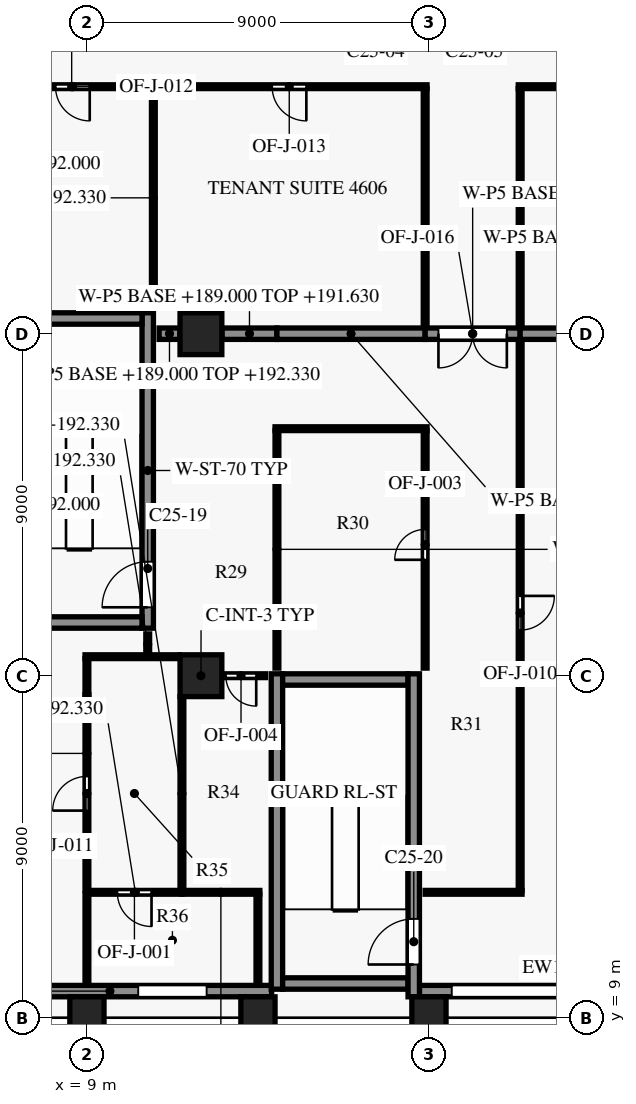
"""IFC4 building model, lengths in metres.
Left out: names, types, materials, properties, quantities, classifications, styles, units other than length and angle.
Written with IfcOpenShell. Run it as: python <this file> out.ifc"""

import sys

from ifc_helpers import new_model, si_unit, direction, frame, frame_2d, origin, origin_2d, place, context, subcontext, project, spatial, rectangle, extrude, element, fill, save


model = new_model("IFC4")
c1 = context("Model", 3, precision=1e-05, world=origin(), true_north=direction((0.0, 1.0)))
c2 = subcontext(c1, "Body", "Model", "MODEL_VIEW")
j1 = project(units=[si_unit("LENGTHUNIT", "METRE"), si_unit("PLANEANGLEUNIT", "RADIAN")], contexts=[c1])
p1 = place(None, origin())
s1 = spatial("IfcSite", under=j1, at=p1, CompositionType="ELEMENT")
p2 = place(p1, origin())
s2 = spatial("IfcBuilding", under=s1, at=p2, CompositionType="ELEMENT")
p3 = place(p2, frame((0.0, 0.0, 189.0)))
s3 = spatial("IfcBuildingStorey", under=s2, at=p3, CompositionType="ELEMENT", Elevation=189.0)
for number, where, z_axis, x_axis in (
    (1, (9.0, 9.0, 0.0), (0.0, 0.0, 1.0), (1.0, 0.0, 0.0)),
    (2, (13.5, 9.0, 0.0), (0.0, 0.0, 1.0), (1.0, 0.0, 0.0)),
    (3, (18.0, 9.0, 0.0), (0.0, 0.0, 1.0), (1.0, 0.0, 0.0)),
):
    element("IfcColumn", number, at=place(p3, frame(where, z_axis=z_axis, x_axis=x_axis)), inside=s3, PredefinedType="COLUMN", context=c2, shape_type="SweptSolid", body=[
        extrude(rectangle(XDim=0.9, YDim=1.1, at=origin_2d()), origin(), (0.0, 0.0, 1.0), 3.8),
    ])
for number, where, z_axis, x_axis in (
    (4, (12.0, 18.0, 0.0), (0.0, 0.0, 1.0), (1.0, 0.0, 0.0)),
    (5, (12.0, 27.0, 0.0), (0.0, 0.0, 1.0), (1.0, 0.0, 0.0)),
):
    element("IfcColumn", number, at=place(p3, frame(where, z_axis=z_axis, x_axis=x_axis)), inside=s3, PredefinedType="COLUMN", context=c2, shape_type="SweptSolid", body=[
        extrude(rectangle(XDim=1.1, YDim=1.1, at=origin_2d()), origin(), (0.0, 0.0, 1.0), 3.8),
    ])
p4 = place(p3, frame((13.86, 9.7, 0.0), z_axis=(0.0, 0.0, 1.0), x_axis=(-1.0, 0.0, 0.0)))
e6 = element("IfcWall", 6, at=p4, inside=s3, PredefinedType="SOLIDWALL", context=c2, shape_type="SweptSolid", body=[
    extrude(rectangle(XDim=8.51, YDim=0.3, at=frame_2d((4.255, 0.0))), origin(), (0.0, 0.0, 1.0), 3.0),
])
p5 = place(p4, frame((1.71, 0.0, 0.75)))
e7 = element("IfcOpeningElement", 7, at=p5, cuts=e6, PredefinedType="OPENING", context=c2, shape_type="SweptSolid", body=[
    extrude(rectangle(XDim=1.8, YDim=1.8, at=frame_2d((0.9, 0.9))), frame((0.0, 0.16, 0.0), z_axis=(0.0, -1.0, 0.0), x_axis=(1.0, 0.0, 0.0)), (0.0, 0.0, 1.0), 0.32),
])
p6 = place(p4, frame((6.21, 0.0, 0.75)))
e8 = element("IfcOpeningElement", 8, at=p6, cuts=e6, PredefinedType="OPENING", context=c2, shape_type="SweptSolid", body=[
    extrude(rectangle(XDim=1.8, YDim=1.8, at=frame_2d((0.9, 0.9))), frame((0.0, 0.16, 0.0), z_axis=(0.0, -1.0, 0.0), x_axis=(1.0, 0.0, 0.0)), (0.0, 0.0, 1.0), 0.32),
])
p7 = place(p3, frame((30.95, 9.7, 0.0), z_axis=(0.0, 0.0, 1.0), x_axis=(-1.0, 0.0, 0.0)))
e9 = element("IfcWall", 9, at=p7, inside=s3, PredefinedType="SOLIDWALL", context=c2, shape_type="SweptSolid", body=[
    extrude(rectangle(XDim=13.2, YDim=0.3, at=frame_2d((6.6, 0.0))), origin(), (0.0, 0.0, 1.0), 3.0),
])
p8 = place(p7, frame((0.8, 0.0, 0.75)))
e10 = element("IfcOpeningElement", 10, at=p8, cuts=e9, PredefinedType="OPENING", context=c2, shape_type="SweptSolid", body=[
    extrude(rectangle(XDim=1.8, YDim=1.8, at=frame_2d((0.9, 0.9))), frame((0.0, 0.16, 0.0), z_axis=(0.0, -1.0, 0.0), x_axis=(1.0, 0.0, 0.0)), (0.0, 0.0, 1.0), 0.32),
])
p9 = place(p7, frame((5.3, 0.0, 0.75)))
e11 = element("IfcOpeningElement", 11, at=p9, cuts=e9, PredefinedType="OPENING", context=c2, shape_type="SweptSolid", body=[
    extrude(rectangle(XDim=1.8, YDim=1.8, at=frame_2d((0.9, 0.9))), frame((0.0, 0.16, 0.0), z_axis=(0.0, -1.0, 0.0), x_axis=(1.0, 0.0, 0.0)), (0.0, 0.0, 1.0), 0.32),
])
p10 = place(p7, frame((9.05, 0.0, 0.15)))
e12 = element("IfcOpeningElement", 12, at=p10, cuts=e9, PredefinedType="OPENING", context=c2, shape_type="SweptSolid", body=[
    extrude(rectangle(XDim=3.3, YDim=2.4, at=frame_2d((1.65, 1.2))), frame((0.0, 0.16, 0.0), z_axis=(0.0, -1.0, 0.0), x_axis=(1.0, 0.0, 0.0)), (0.0, 0.0, 1.0), 0.32),
])
for number, where, z_axis, x_axis in (
    (13, (14.15, 9.9, 0.0), (0.0, 0.0, 1.0), (1.0, 0.0, 0.0)),
    (14, (14.15, 17.9, 0.0), (0.0, 0.0, 1.0), (1.0, 0.0, 0.0)),
    (15, (7.15, 19.4, 0.0), (0.0, 0.0, 1.0), (1.0, 0.0, 0.0)),
    (16, (7.15, 27.4, 0.0), (0.0, 0.0, 1.0), (1.0, 0.0, 0.0)),
):
    element("IfcWall", number, at=place(p3, frame(where, z_axis=z_axis, x_axis=x_axis)), inside=s3, PredefinedType="SHEAR", context=c2, shape_type="SweptSolid", body=[
        extrude(rectangle(XDim=3.3, YDim=0.3, at=frame_2d((1.65, 0.0))), origin(), (0.0, 0.0, 1.0), 3.5),
    ])
p11 = place(p3, frame((10.6, 19.25, 0.0), z_axis=(0.0, 0.0, 1.0), x_axis=(0.0, 1.0, 0.0)))
e17 = element("IfcWall", 17, at=p11, inside=s3, PredefinedType="SHEAR", context=c2, shape_type="SweptSolid", body=[
    extrude(rectangle(XDim=8.3, YDim=0.3, at=frame_2d((4.15, 0.0))), origin(), (0.0, 0.0, 1.0), 3.5),
])
p12 = place(p11, frame((0.55, 0.0, 0.0)))
e18 = element("IfcOpeningElement", 18, at=p12, cuts=e17, PredefinedType="OPENING", context=c2, shape_type="SweptSolid", body=[
    extrude(rectangle(XDim=1.2, YDim=2.2, at=frame_2d((0.6, 1.1))), frame((0.0, 0.16, 0.0), z_axis=(0.0, -1.0, 0.0), x_axis=(1.0, 0.0, 0.0)), (0.0, 0.0, 1.0), 0.32),
])
p13 = place(p3, frame((14.0, 9.75, 0.0), z_axis=(0.0, 0.0, 1.0), x_axis=(0.0, 1.0, 0.0)))
e19 = element("IfcWall", 19, at=p13, inside=s3, PredefinedType="SHEAR", context=c2, shape_type="SweptSolid", body=[
    extrude(rectangle(XDim=8.3, YDim=0.3, at=frame_2d((4.15, 0.0))), origin(), (0.0, 0.0, 1.0), 3.5),
])
p14 = place(p3, frame((17.6, 9.55, 0.0), z_axis=(0.0, 0.0, 1.0), x_axis=(0.0, 1.0, 0.0)))
e20 = element("IfcWall", 20, at=p14, inside=s3, PredefinedType="SHEAR", context=c2, shape_type="SweptSolid", body=[
    extrude(rectangle(XDim=8.5, YDim=0.3, at=frame_2d((4.25, 0.0))), origin(), (0.0, 0.0, 1.0), 3.5),
])
p15 = place(p14, frame((0.85, 0.0, 0.0)))
e21 = element("IfcOpeningElement", 21, at=p15, cuts=e20, PredefinedType="OPENING", context=c2, shape_type="SweptSolid", body=[
    extrude(rectangle(XDim=1.2, YDim=2.2, at=frame_2d((0.6, 1.1))), frame((0.0, 0.16, 0.0), z_axis=(0.0, -1.0, 0.0), x_axis=(1.0, 0.0, 0.0)), (0.0, 0.0, 1.0), 0.32),
])
p16 = place(p3, frame((9.0, 9.87, 0.0), z_axis=(0.0, 0.0, 1.0), x_axis=(0.0, 1.0, 0.0)))
e22 = element("IfcWall", 22, at=p16, inside=s3, PredefinedType="PARTITIONING", context=c2, shape_type="SweptSolid", body=[
    extrude(rectangle(XDim=2.38, YDim=0.1, at=frame_2d((1.19, 0.0))), origin(), (0.0, 0.0, 1.0), 3.33),
])
p17 = place(p3, frame((13.5, 12.25, 0.0), z_axis=(0.0, 0.0, 1.0), x_axis=(0.0, -1.0, 0.0)))
e23 = element("IfcWall", 23, at=p17, inside=s3, PredefinedType="PARTITIONING", context=c2, shape_type="SweptSolid", body=[
    extrude(rectangle(XDim=2.38, YDim=0.1, at=frame_2d((1.19, 0.0))), origin(), (0.0, 0.0, 1.0), 2.63),
])
p18 = place(p3, frame((11.5, 12.3, 0.0), z_axis=(0.0, 0.0, 1.0), x_axis=(-1.0, 0.0, 0.0)))
e24 = element("IfcWall", 24, at=p18, inside=s3, PredefinedType="PARTITIONING", context=c2, shape_type="SweptSolid", body=[
    extrude(rectangle(XDim=2.45, YDim=0.1, at=frame_2d((1.225, 0.0))), origin(), (0.0, 0.0, 1.0), 3.33),
])
p19 = place(p18, frame((0.8, 0.0, 0.0)))
e25 = element("IfcOpeningElement", 25, at=p19, cuts=e24, PredefinedType="OPENING", context=c2, shape_type="SweptSolid", body=[
    extrude(rectangle(XDim=0.9, YDim=2.1, at=frame_2d((0.45, 1.05))), frame((0.0, 0.06, 0.0), z_axis=(0.0, -1.0, 0.0), x_axis=(1.0, 0.0, 0.0)), (0.0, 0.0, 1.0), 0.12),
])
p20 = place(p3, frame((11.5, 12.3, 0.0), z_axis=(0.0, 0.0, 1.0), x_axis=(1.0, 0.0, 0.0)))
e26 = element("IfcWall", 26, at=p20, inside=s3, PredefinedType="PARTITIONING", context=c2, shape_type="SweptSolid", body=[
    extrude(rectangle(XDim=2.05, YDim=0.1, at=frame_2d((1.025, 0.0))), origin(), (0.0, 0.0, 1.0), 2.63),
])
p21 = place(p3, frame((20.45, 12.3, 0.0), z_axis=(0.0, 0.0, 1.0), x_axis=(-1.0, 0.0, 0.0)))
e27 = element("IfcWall", 27, at=p21, inside=s3, PredefinedType="PARTITIONING", context=c2, shape_type="SweptSolid", body=[
    extrude(rectangle(XDim=2.55, YDim=0.1, at=frame_2d((1.275, 0.0))), origin(), (0.0, 0.0, 1.0), 2.63),
])
p22 = place(p3, frame((9.0, 12.35, 0.0), z_axis=(0.0, 0.0, 1.0), x_axis=(0.0, 1.0, 0.0)))
e28 = element("IfcWall", 28, at=p22, inside=s3, PredefinedType="PARTITIONING", context=c2, shape_type="SweptSolid", body=[
    extrude(rectangle(XDim=5.15, YDim=0.1, at=frame_2d((2.575, 0.0))), origin(), (0.0, 0.0, 1.0), 3.33),
])
p23 = place(p22, frame((2.1, 0.0, 0.0)))
e29 = element("IfcOpeningElement", 29, at=p23, cuts=e28, PredefinedType="OPENING", context=c2, shape_type="SweptSolid", body=[
    extrude(rectangle(XDim=0.9, YDim=2.1, at=frame_2d((0.45, 1.05))), frame((0.0, 0.06, 0.0), z_axis=(0.0, -1.0, 0.0), x_axis=(1.0, 0.0, 0.0)), (0.0, 0.0, 1.0), 0.12),
])
p24 = place(p3, frame((11.5, 17.445, 0.0), z_axis=(0.0, 0.0, 1.0), x_axis=(0.0, -1.0, 0.0)))
e30 = element("IfcWall", 30, at=p24, inside=s3, PredefinedType="PARTITIONING", context=c2, shape_type="SweptSolid", body=[
    extrude(rectangle(XDim=5.095, YDim=0.1, at=frame_2d((2.547, 0.0))), origin(), (0.0, 0.0, 1.0), 3.33),
])
p25 = place(p3, frame((9.0, 17.5, 0.0), z_axis=(0.0, 0.0, 1.0), x_axis=(0.0, 1.0, 0.0)))
e31 = element("IfcWall", 31, at=p25, inside=s3, PredefinedType="PARTITIONING", context=c2, shape_type="SweptSolid", body=[
    extrude(rectangle(XDim=0.95, YDim=0.1, at=frame_2d((0.475, 0.0))), origin(), (0.0, 0.0, 1.0), 2.78),
])
p26 = place(p3, frame((13.7, 18.0, 0.0), z_axis=(0.0, 0.0, 1.0), x_axis=(-1.0, 0.0, 0.0)))
e32 = element("IfcWall", 32, at=p26, inside=s3, PredefinedType="PARTITIONING", context=c2, shape_type="SweptSolid", body=[
    extrude(rectangle(XDim=1.145, YDim=0.1, at=frame_2d((0.573, 0.0))), origin(), (0.0, 0.0, 1.0), 2.63),
])
p27 = place(p26, frame((0.245, 0.0, 0.0)))
e33 = element("IfcOpeningElement", 33, at=p27, cuts=e32, PredefinedType="OPENING", context=c2, shape_type="SweptSolid", body=[
    extrude(rectangle(XDim=0.8, YDim=2.1, at=frame_2d((0.4, 1.05))), frame((0.0, 0.06, 0.0), z_axis=(0.0, -1.0, 0.0), x_axis=(1.0, 0.0, 0.0)), (0.0, 0.0, 1.0), 0.12),
])
p28 = place(p3, frame((17.9, 18.2, 0.0), z_axis=(0.0, 0.0, 1.0), x_axis=(0.0, 1.0, 0.0)))
e34 = element("IfcWall", 34, at=p28, inside=s3, PredefinedType="PARTITIONING", context=c2, shape_type="SweptSolid", body=[
    extrude(rectangle(XDim=6.25, YDim=0.1, at=frame_2d((3.125, 0.0))), origin(), (0.0, 0.0, 1.0), 2.63),
])
p29 = place(p28, frame((2.85, 0.0, 0.0)))
e35 = element("IfcOpeningElement", 35, at=p29, cuts=e34, PredefinedType="OPENING", context=c2, shape_type="SweptSolid", body=[
    extrude(rectangle(XDim=0.8, YDim=2.1, at=frame_2d((0.4, 1.05))), frame((0.0, 0.06, 0.0), z_axis=(0.0, -1.0, 0.0), x_axis=(1.0, 0.0, 0.0)), (0.0, 0.0, 1.0), 0.12),
])
p30 = place(p3, frame((8.95, 18.5, 0.0), z_axis=(0.0, 0.0, 1.0), x_axis=(1.0, 0.0, 0.0)))
e36 = element("IfcWall", 36, at=p30, inside=s3, PredefinedType="PARTITIONING", context=c2, shape_type="SweptSolid", body=[
    extrude(rectangle(XDim=2.48, YDim=0.1, at=frame_2d((1.24, 0.0))), origin(), (0.0, 0.0, 1.0), 3.33),
])
p31 = place(p3, frame((10.6, 18.55, 0.0), z_axis=(0.0, 0.0, 1.0), x_axis=(0.0, 1.0, 0.0)))
e37 = element("IfcWall", 37, at=p31, inside=s3, PredefinedType="PARTITIONING", context=c2, shape_type="SweptSolid", body=[
    extrude(rectangle(XDim=0.55, YDim=0.1, at=frame_2d((0.275, 0.0))), origin(), (0.0, 0.0, 1.0), 3.33),
])
p32 = place(p3, frame((14.0, 24.45, 0.0), z_axis=(0.0, 0.0, 1.0), x_axis=(0.0, -1.0, 0.0)))
e38 = element("IfcWall", 38, at=p32, inside=s3, PredefinedType="PARTITIONING", context=c2, shape_type="SweptSolid", body=[
    extrude(rectangle(XDim=6.25, YDim=0.1, at=frame_2d((3.125, 0.0))), origin(), (0.0, 0.0, 1.0), 3.33),
])
p33 = place(p3, frame((17.95, 24.5, 0.0), z_axis=(0.0, 0.0, 1.0), x_axis=(-1.0, 0.0, 0.0)))
e39 = element("IfcWall", 39, at=p33, inside=s3, PredefinedType="PARTITIONING", context=c2, shape_type="SweptSolid", body=[
    extrude(rectangle(XDim=4.0, YDim=0.1, at=frame_2d((2.0, 0.0))), origin(), (0.0, 0.0, 1.0), 2.63),
])
p34 = place(p3, frame((20.4, 26.83, 0.0), z_axis=(0.0, 0.0, 1.0), x_axis=(0.0, -1.0, 0.0)))
e40 = element("IfcWall", 40, at=p34, inside=s3, PredefinedType="PARTITIONING", context=c2, shape_type="SweptSolid", body=[
    extrude(rectangle(XDim=14.48, YDim=0.1, at=frame_2d((7.24, 0.0))), origin(), (0.0, 0.0, 1.0), 2.63),
])
p35 = place(p34, frame((6.73, 0.0, 0.0)))
e41 = element("IfcOpeningElement", 41, at=p35, cuts=e40, PredefinedType="OPENING", context=c2, shape_type="SweptSolid", body=[
    extrude(rectangle(XDim=0.9, YDim=2.1, at=frame_2d((0.45, 1.05))), frame((0.0, 0.06, 0.0), z_axis=(0.0, -1.0, 0.0), x_axis=(1.0, 0.0, 0.0)), (0.0, 0.0, 1.0), 0.12),
])
p36 = place(p3, frame((10.9, 27.0, 0.0), z_axis=(0.0, 0.0, 1.0), x_axis=(1.0, 0.0, 0.0)))
e42 = element("IfcWall", 42, at=p36, inside=s3, PredefinedType="PARTITIONING", context=c2, shape_type="SweptSolid", body=[
    extrude(rectangle(XDim=0.545, YDim=0.3, at=frame_2d((0.272, 0.0))), origin(), (0.0, 0.0, 1.0), 3.33),
])
p37 = place(p3, frame((12.555, 27.0, 0.0), z_axis=(0.0, 0.0, 1.0), x_axis=(1.0, 0.0, 0.0)))
e43 = element("IfcWall", 43, at=p37, inside=s3, PredefinedType="PARTITIONING", context=c2, shape_type="SweptSolid", body=[
    extrude(rectangle(XDim=1.445, YDim=0.3, at=frame_2d((0.723, 0.0))), origin(), (0.0, 0.0, 1.0), 2.63),
])
p38 = place(p3, frame((14.0, 27.0, 0.0), z_axis=(0.0, 0.0, 1.0), x_axis=(1.0, 0.0, 0.0)))
e44 = element("IfcWall", 44, at=p38, inside=s3, PredefinedType="PARTITIONING", context=c2, shape_type="SweptSolid", body=[
    extrude(rectangle(XDim=3.9, YDim=0.3, at=frame_2d((1.95, 0.0))), origin(), (0.0, 0.0, 1.0), 2.63),
])
p39 = place(p3, frame((20.4, 27.0, 0.0), z_axis=(0.0, 0.0, 1.0), x_axis=(-1.0, 0.0, 0.0)))
e45 = element("IfcWall", 45, at=p39, inside=s3, PredefinedType="PARTITIONING", context=c2, shape_type="SweptSolid", body=[
    extrude(rectangle(XDim=2.5, YDim=0.3, at=frame_2d((1.25, 0.0))), origin(), (0.0, 0.0, 1.0), 2.63),
])
p40 = place(p39, frame((0.35, 0.0, 0.0)))
e46 = element("IfcOpeningElement", 46, at=p40, cuts=e45, PredefinedType="OPENING", context=c2, shape_type="SweptSolid", body=[
    extrude(rectangle(XDim=1.8, YDim=2.1, at=frame_2d((0.9, 1.05))), frame((0.0, 0.16, 0.0), z_axis=(0.0, -1.0, 0.0), x_axis=(1.0, 0.0, 0.0)), (0.0, 0.0, 1.0), 0.32),
])
p41 = place(p3, frame((20.4, 27.0, 0.0), z_axis=(0.0, 0.0, 1.0), x_axis=(1.0, 0.0, 0.0)))
e47 = element("IfcWall", 47, at=p41, inside=s3, PredefinedType="PARTITIONING", context=c2, shape_type="SweptSolid", body=[
    extrude(rectangle(XDim=3.045, YDim=0.3, at=frame_2d((1.522, 0.0))), origin(), (0.0, 0.0, 1.0), 2.63),
])
p42 = place(p3, frame((17.9, 27.17, 0.0), z_axis=(0.0, 0.0, 1.0), x_axis=(0.0, 1.0, 0.0)))
e48 = element("IfcWall", 48, at=p42, inside=s3, PredefinedType="PARTITIONING", context=c2, shape_type="SweptSolid", body=[
    extrude(rectangle(XDim=6.28, YDim=0.1, at=frame_2d((3.14, 0.0))), origin(), (0.0, 0.0, 1.0), 2.63),
])
p43 = place(p3, frame((10.748, 33.45, 0.0), z_axis=(0.0, 0.0, 1.0), x_axis=(0.0, -1.0, 0.0)))
e49 = element("IfcWall", 49, at=p43, inside=s3, PredefinedType="PARTITIONING", context=c2, shape_type="SweptSolid", body=[
    extrude(rectangle(XDim=5.75, YDim=0.1, at=frame_2d((2.875, 0.0))), origin(), (0.0, 0.0, 1.0), 3.33),
])
p44 = place(p3, frame((20.4, 33.45, 0.0), z_axis=(0.0, 0.0, 1.0), x_axis=(0.0, -1.0, 0.0)))
e50 = element("IfcWall", 50, at=p44, inside=s3, PredefinedType="PARTITIONING", context=c2, shape_type="SweptSolid", body=[
    extrude(rectangle(XDim=6.28, YDim=0.1, at=frame_2d((3.14, 0.0))), origin(), (0.0, 0.0, 1.0), 2.63),
])
p45 = place(p3, frame((10.748, 33.5, 0.0), z_axis=(0.0, 0.0, 1.0), x_axis=(-1.0, 0.0, 0.0)))
e51 = element("IfcWall", 51, at=p45, inside=s3, PredefinedType="PARTITIONING", context=c2, shape_type="SweptSolid", body=[
    extrude(rectangle(XDim=4.298, YDim=0.1, at=frame_2d((2.149, 0.0))), origin(), (0.0, 0.0, 1.0), 3.33),
])
p46 = place(p45, frame((1.674, 0.0, 0.0)))
e52 = element("IfcOpeningElement", 52, at=p46, cuts=e51, PredefinedType="OPENING", context=c2, shape_type="SweptSolid", body=[
    extrude(rectangle(XDim=0.9, YDim=2.1, at=frame_2d((0.45, 1.05))), frame((0.0, 0.06, 0.0), z_axis=(0.0, -1.0, 0.0), x_axis=(1.0, 0.0, 0.0)), (0.0, 0.0, 1.0), 0.12),
])
p47 = place(p3, frame((17.95, 33.5, 0.0), z_axis=(0.0, 0.0, 1.0), x_axis=(-1.0, 0.0, 0.0)))
e53 = element("IfcWall", 53, at=p47, inside=s3, PredefinedType="PARTITIONING", context=c2, shape_type="SweptSolid", body=[
    extrude(rectangle(XDim=7.202, YDim=0.1, at=frame_2d((3.601, 0.0))), origin(), (0.0, 0.0, 1.0), 2.63),
])
p48 = place(p47, frame((3.176, 0.0, 0.0)))
e54 = element("IfcOpeningElement", 54, at=p48, cuts=e53, PredefinedType="OPENING", context=c2, shape_type="SweptSolid", body=[
    extrude(rectangle(XDim=0.9, YDim=2.1, at=frame_2d((0.45, 1.05))), frame((0.0, 0.06, 0.0), z_axis=(0.0, -1.0, 0.0), x_axis=(1.0, 0.0, 0.0)), (0.0, 0.0, 1.0), 0.12),
])
p49 = place(p3, frame((31.05, 33.5, 0.0), z_axis=(0.0, 0.0, 1.0), x_axis=(-1.0, 0.0, 0.0)))
e55 = element("IfcWall", 55, at=p49, inside=s3, PredefinedType="PARTITIONING", context=c2, shape_type="SweptSolid", body=[
    extrude(rectangle(XDim=10.7, YDim=0.1, at=frame_2d((5.35, 0.0))), origin(), (0.0, 0.0, 1.0), 2.63),
])
p50 = place(p5, origin())
e56 = element("IfcWindow", 56, at=p50, inside=s3, PartitioningType="SINGLE_PANEL", PredefinedType="WINDOW", context=c2, shape_type="SweptSolid", body=[
    extrude(rectangle(XDim=1.8, YDim=1.8, at=frame_2d((0.9, 0.9))), frame((0.0, 0.03, 0.0), z_axis=(0.0, -1.0, 0.0), x_axis=(1.0, 0.0, 0.0)), (0.0, 0.0, 1.0), 0.06),
])
fill(e7, e56)
p51 = place(p10, origin())
e57 = element("IfcWindow", 57, at=p51, inside=s3, PartitioningType="SINGLE_PANEL", PredefinedType="WINDOW", context=c2, shape_type="SweptSolid", body=[
    extrude(rectangle(XDim=3.3, YDim=2.4, at=frame_2d((1.65, 1.2))), frame((0.0, 0.03, 0.0), z_axis=(0.0, -1.0, 0.0), x_axis=(1.0, 0.0, 0.0)), (0.0, 0.0, 1.0), 0.06),
])
fill(e12, e57)
p52 = place(p12, origin())
e58 = element("IfcDoor", 58, at=p52, inside=s3, OperationType="SINGLE_SWING_RIGHT", PredefinedType="DOOR", context=c2, shape_type="SweptSolid", body=[
    extrude(rectangle(XDim=1.2, YDim=2.2, at=frame_2d((0.6, 1.1))), frame((0.0, 0.025, 0.0), z_axis=(0.0, -1.0, 0.0), x_axis=(1.0, 0.0, 0.0)), (0.0, 0.0, 1.0), 0.05),
])
fill(e18, e58)
p53 = place(p15, origin())
e59 = element("IfcDoor", 59, at=p53, inside=s3, OperationType="SINGLE_SWING_LEFT", PredefinedType="DOOR", context=c2, shape_type="SweptSolid", body=[
    extrude(rectangle(XDim=1.2, YDim=2.2, at=frame_2d((0.6, 1.1))), frame((0.0, 0.025, 0.0), z_axis=(0.0, -1.0, 0.0), x_axis=(1.0, 0.0, 0.0)), (0.0, 0.0, 1.0), 0.05),
])
fill(e21, e59)
p54 = place(p19, origin())
e60 = element("IfcDoor", 60, at=p54, inside=s3, OperationType="SINGLE_SWING_RIGHT", PredefinedType="DOOR", context=c2, shape_type="SweptSolid", body=[
    extrude(rectangle(XDim=0.9, YDim=2.1, at=frame_2d((0.45, 1.05))), frame((0.0, 0.025, 0.0), z_axis=(0.0, -1.0, 0.0), x_axis=(1.0, 0.0, 0.0)), (0.0, 0.0, 1.0), 0.05),
])
fill(e25, e60)
p55 = place(p29, origin())
e61 = element("IfcDoor", 61, at=p55, inside=s3, OperationType="SINGLE_SWING_LEFT", PredefinedType="DOOR", context=c2, shape_type="SweptSolid", body=[
    extrude(rectangle(XDim=0.8, YDim=2.1, at=frame_2d((0.4, 1.05))), frame((0.0, 0.025, 0.0), z_axis=(0.0, -1.0, 0.0), x_axis=(1.0, 0.0, 0.0)), (0.0, 0.0, 1.0), 0.05),
])
fill(e35, e61)
p56 = place(p27, origin())
e62 = element("IfcDoor", 62, at=p56, inside=s3, OperationType="SINGLE_SWING_LEFT", PredefinedType="DOOR", context=c2, shape_type="SweptSolid", body=[
    extrude(rectangle(XDim=0.8, YDim=2.1, at=frame_2d((0.4, 1.05))), frame((0.0, 0.025, 0.0), z_axis=(0.0, -1.0, 0.0), x_axis=(1.0, 0.0, 0.0)), (0.0, 0.0, 1.0), 0.05),
])
fill(e33, e62)
p57 = place(p35, origin())
e63 = element("IfcDoor", 63, at=p57, inside=s3, OperationType="SINGLE_SWING_LEFT", PredefinedType="DOOR", context=c2, shape_type="SweptSolid", body=[
    extrude(rectangle(XDim=0.9, YDim=2.1, at=frame_2d((0.45, 1.05))), frame((0.0, 0.025, 0.0), z_axis=(0.0, -1.0, 0.0), x_axis=(1.0, 0.0, 0.0)), (0.0, 0.0, 1.0), 0.05),
])
fill(e41, e63)
p58 = place(p23, origin())
e64 = element("IfcDoor", 64, at=p58, inside=s3, OperationType="SINGLE_SWING_RIGHT", PredefinedType="DOOR", context=c2, shape_type="SweptSolid", body=[
    extrude(rectangle(XDim=0.9, YDim=2.1, at=frame_2d((0.45, 1.05))), frame((0.0, 0.025, 0.0), z_axis=(0.0, -1.0, 0.0), x_axis=(1.0, 0.0, 0.0)), (0.0, 0.0, 1.0), 0.05),
])
fill(e29, e64)
p59 = place(p46, origin())
e65 = element("IfcDoor", 65, at=p59, inside=s3, OperationType="SINGLE_SWING_RIGHT", PredefinedType="DOOR", context=c2, shape_type="SweptSolid", body=[
    extrude(rectangle(XDim=0.9, YDim=2.1, at=frame_2d((0.45, 1.05))), frame((0.0, 0.025, 0.0), z_axis=(0.0, -1.0, 0.0), x_axis=(1.0, 0.0, 0.0)), (0.0, 0.0, 1.0), 0.05),
])
fill(e52, e65)
p60 = place(p48, origin())
e66 = element("IfcDoor", 66, at=p60, inside=s3, OperationType="SINGLE_SWING_RIGHT", PredefinedType="DOOR", context=c2, shape_type="SweptSolid", body=[
    extrude(rectangle(XDim=0.9, YDim=2.1, at=frame_2d((0.45, 1.05))), frame((0.0, 0.025, 0.0), z_axis=(0.0, -1.0, 0.0), x_axis=(1.0, 0.0, 0.0)), (0.0, 0.0, 1.0), 0.05),
])
fill(e54, e66)
p61 = place(p40, origin())
e67 = element("IfcDoor", 67, at=p61, inside=s3, OperationType="DOUBLE_DOOR_SINGLE_SWING", PredefinedType="DOOR", context=c2, shape_type="SweptSolid", body=[
    extrude(rectangle(XDim=1.8, YDim=2.1, at=frame_2d((0.9, 1.05))), frame((0.0, 0.025, 0.0), z_axis=(0.0, -1.0, 0.0), x_axis=(1.0, 0.0, 0.0)), (0.0, 0.0, 1.0), 0.05),
])
fill(e46, e67)
save(model, sys.argv[1])
